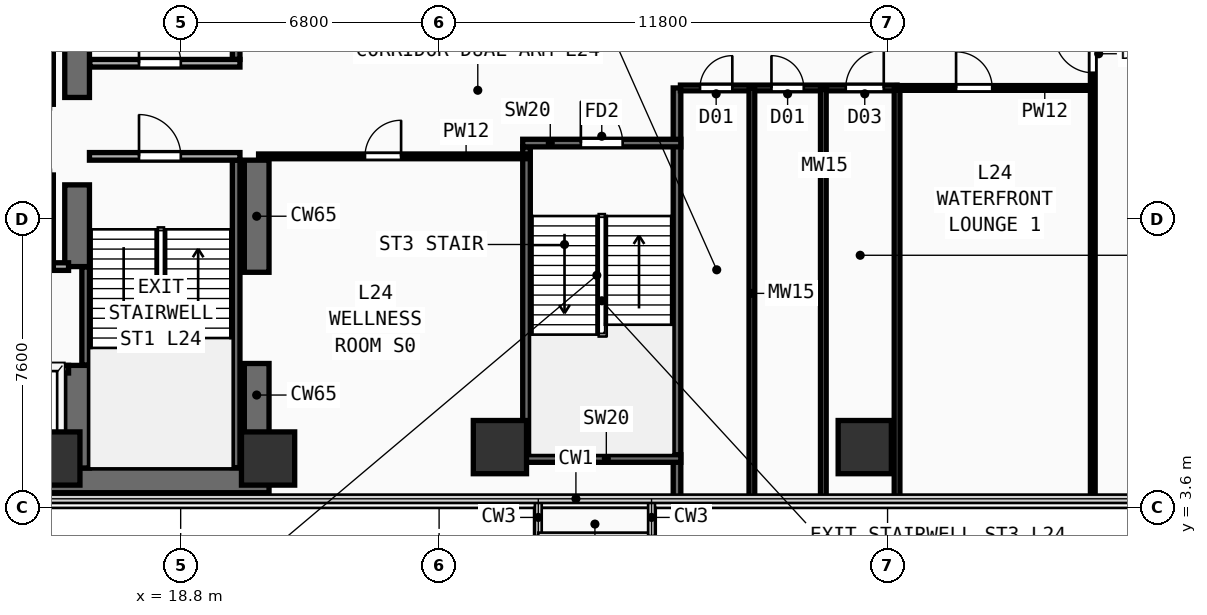
"""IFC4 building model, lengths in metres.
Left out: names, types, materials, properties, quantities, classifications, styles, units other than length and angle.
Written with IfcOpenShell. Run it as: python <this file> out.ifc"""

import sys

from ifc_helpers import new_model, si_unit, direction, frame, frame_2d, origin, origin_2d, place, context, subcontext, project, spatial, rectangle, extrude, element, fill, save


model = new_model("IFC4")
c1 = context("Model", 3, precision=1e-05, world=origin(), true_north=direction((0.0, 1.0)))
c2 = subcontext(c1, "Body", "Model", "MODEL_VIEW")
j1 = project(units=[si_unit("LENGTHUNIT", "METRE"), si_unit("PLANEANGLEUNIT", "RADIAN")], contexts=[c1])
p1 = place(None, origin())
s1 = spatial("IfcSite", under=j1, at=p1, CompositionType="ELEMENT")
p2 = place(p1, origin())
s2 = spatial("IfcBuilding", under=s1, at=p2, CompositionType="ELEMENT")
p3 = place(p2, frame((0.0, 0.0, 95.5)))
s3 = spatial("IfcBuildingStorey", under=s2, at=p3, CompositionType="ELEMENT", Elevation=95.5)
p4 = place(p3, frame((7.125, 4.325, 0.0), z_axis=(0.0, 0.0, 1.0), x_axis=(1.0, 0.0, 0.0)))
e1 = element("IfcWall", 1, at=p4, inside=s3, PredefinedType="SHEAR", context=c2, shape_type="SweptSolid", body=[
    extrude(rectangle(XDim=14.0, YDim=0.65, at=frame_2d((7.0, 0.0))), origin(), (0.0, 0.0, 1.0), 3.54),
])
p5 = place(p3, frame((20.8, 4.65, 0.0), z_axis=(0.0, 0.0, 1.0), x_axis=(0.0, 1.0, 0.0)))
e2 = element("IfcWall", 2, at=p5, inside=s3, PredefinedType="SHEAR", context=c2, shape_type="SweptSolid", body=[
    extrude(rectangle(XDim=2.75, YDim=0.65, at=frame_2d((1.375, 0.0))), origin(), (0.0, 0.0, 1.0), 3.54),
])
p6 = place(p3, frame((20.8, 9.8, 0.0), z_axis=(0.0, 0.0, 1.0), x_axis=(0.0, 1.0, 0.0)))
e3 = element("IfcWall", 3, at=p6, inside=s3, PredefinedType="SHEAR", context=c2, shape_type="SweptSolid", body=[
    extrude(rectangle(XDim=2.95, YDim=0.65, at=frame_2d((1.475, 0.0))), origin(), (0.0, 0.0, 1.0), 3.54),
])
p7 = place(p3, frame((16.075, 4.65, 0.0), z_axis=(0.0, 0.0, 1.0), x_axis=(0.0, 1.0, 0.0)))
e4 = element("IfcWall", 4, at=p7, inside=s3, PredefinedType="SHEAR", context=c2, shape_type="SweptSolid", body=[
    extrude(rectangle(XDim=2.7, YDim=0.65, at=frame_2d((1.35, 0.0))), origin(), (0.0, 0.0, 1.0), 3.54),
])
p8 = place(p3, frame((16.075, 9.95, 0.0), z_axis=(0.0, 0.0, 1.0), x_axis=(0.0, 1.0, 0.0)))
e5 = element("IfcWall", 5, at=p8, inside=s3, PredefinedType="SHEAR", context=c2, shape_type="SweptSolid", body=[
    extrude(rectangle(XDim=2.15, YDim=0.65, at=frame_2d((1.075, 0.0))), origin(), (0.0, 0.0, 1.0), 3.54),
])
p9 = place(p3, frame((16.075, 14.4, 0.0), z_axis=(0.0, 0.0, 1.0), x_axis=(0.0, 1.0, 0.0)))
e6 = element("IfcWall", 6, at=p9, inside=s3, PredefinedType="SHEAR", context=c2, shape_type="SweptSolid", body=[
    extrude(rectangle(XDim=9.1, YDim=0.65, at=frame_2d((4.55, 0.0))), origin(), (0.0, 0.0, 1.0), 3.54),
])
for number, where, z_axis, x_axis in (
    (7, (15.45, 4.9, 0.0), (0.0, 0.0, 1.0), (1.0, 0.0, 0.0)),
    (8, (21.1, 4.9, 0.0), (0.0, 0.0, 1.0), (1.0, 0.0, 0.0)),
    (9, (27.2, 5.2, 0.0), (0.0, 0.0, 1.0), (1.0, 0.0, 0.0)),
    (10, (36.8, 5.2, 0.0), (0.0, 0.0, 1.0), (1.0, 0.0, 0.0)),
):
    element("IfcColumn", number, at=place(p3, frame(where, z_axis=z_axis, x_axis=x_axis)), inside=s3, PredefinedType="COLUMN", context=c2, shape_type="SweptSolid", body=[
        extrude(rectangle(XDim=1.4, YDim=1.4, at=origin_2d()), origin(), (0.0, 0.0, 1.0), 3.54),
    ])
p10 = place(p3, frame((16.3, 7.36, 0.0), z_axis=(0.0, 0.0, 1.0), x_axis=(0.0, 1.0, 0.0)))
e11 = element("IfcWall", 11, at=p10, inside=s3, PredefinedType="SHEAR", context=c2, shape_type="SweptSolid", body=[
    extrude(rectangle(XDim=2.58, YDim=0.2, at=frame_2d((1.29, 0.0))), origin(), (0.0, 0.0, 1.0), 3.54),
])
p11 = place(p3, frame((20.26, 4.66, 0.0), z_axis=(0.0, 0.0, 1.0), x_axis=(0.0, 1.0, 0.0)))
e12 = element("IfcWall", 12, at=p11, inside=s3, PredefinedType="SHEAR", context=c2, shape_type="SweptSolid", body=[
    extrude(rectangle(XDim=8.09, YDim=0.2, at=frame_2d((4.045, 0.0))), origin(), (0.0, 0.0, 1.0), 3.54),
])
p12 = place(p3, frame((16.4, 12.85, 0.0), z_axis=(0.0, 0.0, 1.0), x_axis=(1.0, 0.0, 0.0)))
e13 = element("IfcWall", 13, at=p12, inside=s3, PredefinedType="PARTITIONING", context=c2, shape_type="SweptSolid", body=[
    extrude(rectangle(XDim=3.96, YDim=0.2, at=frame_2d((1.98, 0.0))), origin(), (0.0, 0.0, 1.0), 3.54),
])
p13 = place(p12, frame((1.304, 0.0, 0.0)))
e14 = element("IfcOpeningElement", 14, at=p13, cuts=e13, PredefinedType="OPENING", context=c2, shape_type="SweptSolid", body=[
    extrude(rectangle(XDim=1.1, YDim=2.2, at=frame_2d((0.55, 1.1))), frame((0.0, 0.11, 0.0), z_axis=(0.0, -1.0, 0.0), x_axis=(1.0, 0.0, 0.0)), (0.0, 0.0, 1.0), 0.22),
])
p14 = place(p3, frame((20.26, 15.4, 0.0), z_axis=(0.0, 0.0, 1.0), x_axis=(0.0, 1.0, 0.0)))
e15 = element("IfcWall", 15, at=p14, inside=s3, PredefinedType="SHEAR", context=c2, shape_type="SweptSolid", body=[
    extrude(rectangle(XDim=8.09, YDim=0.2, at=frame_2d((4.045, 0.0))), origin(), (0.0, 0.0, 1.0), 3.54),
])
p15 = place(p3, frame((16.41, 15.3, 0.0), z_axis=(0.0, 0.0, 1.0), x_axis=(1.0, 0.0, 0.0)))
e16 = element("IfcWall", 16, at=p15, inside=s3, PredefinedType="PARTITIONING", context=c2, shape_type="SweptSolid", body=[
    extrude(rectangle(XDim=3.95, YDim=0.2, at=frame_2d((1.975, 0.0))), origin(), (0.0, 0.0, 1.0), 3.54),
])
p16 = place(p15, frame((1.294, 0.0, 0.0)))
e17 = element("IfcOpeningElement", 17, at=p16, cuts=e16, PredefinedType="OPENING", context=c2, shape_type="SweptSolid", body=[
    extrude(rectangle(XDim=1.1, YDim=2.2, at=frame_2d((0.55, 1.1))), frame((0.0, 0.11, 0.0), z_axis=(0.0, -1.0, 0.0), x_axis=(1.0, 0.0, 0.0)), (0.0, 0.0, 1.0), 0.22),
])
p17 = place(p3, frame((27.9, 5.0, 0.0), z_axis=(0.0, 0.0, 1.0), x_axis=(0.0, 1.0, 0.0)))
e18 = element("IfcWall", 18, at=p17, inside=s3, PredefinedType="SHEAR", context=c2, shape_type="SweptSolid", body=[
    extrude(rectangle(XDim=8.1, YDim=0.2, at=frame_2d((4.05, 0.0))), origin(), (0.0, 0.0, 1.0), 3.54),
])
p18 = place(p3, frame((31.86, 3.84, 0.0), z_axis=(0.0, 0.0, 1.0), x_axis=(0.0, 1.0, 0.0)))
e19 = element("IfcWall", 19, at=p18, inside=s3, PredefinedType="SHEAR", context=c2, shape_type="SweptSolid", body=[
    extrude(rectangle(XDim=10.81, YDim=0.2, at=frame_2d((5.405, 0.0))), origin(), (0.0, 0.0, 1.0), 3.54),
])
p19 = place(p3, frame((27.8, 4.9, 0.0), z_axis=(0.0, 0.0, 1.0), x_axis=(1.0, 0.0, 0.0)))
e20 = element("IfcWall", 20, at=p19, inside=s3, PredefinedType="SHEAR", context=c2, shape_type="SweptSolid", body=[
    extrude(rectangle(XDim=4.16, YDim=0.2, at=frame_2d((2.08, 0.0))), origin(), (0.0, 0.0, 1.0), 3.54),
])
p20 = place(p3, frame((27.8, 13.2, 0.0), z_axis=(0.0, 0.0, 1.0), x_axis=(1.0, 0.0, 0.0)))
e21 = element("IfcWall", 21, at=p20, inside=s3, PredefinedType="SHEAR", context=c2, shape_type="SweptSolid", body=[
    extrude(rectangle(XDim=4.16, YDim=0.2, at=frame_2d((2.08, 0.0))), origin(), (0.0, 0.0, 1.0), 3.54),
])
p21 = place(p20, frame((1.53, 0.0, 0.0)))
e22 = element("IfcOpeningElement", 22, at=p21, cuts=e21, PredefinedType="OPENING", context=c2, shape_type="SweptSolid", body=[
    extrude(rectangle(XDim=1.1, YDim=2.2, at=frame_2d((0.55, 1.1))), frame((0.0, 0.11, 0.0), z_axis=(0.0, -1.0, 0.0), x_axis=(1.0, 0.0, 0.0)), (0.0, 0.0, 1.0), 0.22),
])
p22 = place(p3, frame((7.5, 7.25, 0.0), z_axis=(0.0, 0.0, 1.0), x_axis=(1.0, 0.0, 0.0)))
e23 = element("IfcWall", 23, at=p22, inside=s3, PredefinedType="PARTITIONING", context=c2, shape_type="SweptSolid", body=[
    extrude(rectangle(XDim=8.35, YDim=0.2, at=frame_2d((4.175, 0.0))), origin(), (0.0, 0.0, 1.0), 3.54),
])
p23 = place(p22, frame((0.53, 0.0, 0.0)))
e24 = element("IfcOpeningElement", 24, at=p23, cuts=e23, PredefinedType="OPENING", context=c2, shape_type="SweptSolid", body=[
    extrude(rectangle(XDim=1.1, YDim=2.2, at=frame_2d((0.55, 1.1))), frame((0.0, 0.11, 0.0), z_axis=(0.0, -1.0, 0.0), x_axis=(1.0, 0.0, 0.0)), (0.0, 0.0, 1.0), 0.22),
])
p24 = place(p22, frame((2.37, 0.0, 0.0)))
e25 = element("IfcOpeningElement", 25, at=p24, cuts=e23, PredefinedType="OPENING", context=c2, shape_type="SweptSolid", body=[
    extrude(rectangle(XDim=1.1, YDim=2.2, at=frame_2d((0.55, 1.1))), frame((0.0, 0.11, 0.0), z_axis=(0.0, -1.0, 0.0), x_axis=(1.0, 0.0, 0.0)), (0.0, 0.0, 1.0), 0.22),
])
p25 = place(p22, frame((4.33, 0.0, 0.0)))
e26 = element("IfcOpeningElement", 26, at=p25, cuts=e23, PredefinedType="OPENING", context=c2, shape_type="SweptSolid", body=[
    extrude(rectangle(XDim=1.1, YDim=2.2, at=frame_2d((0.55, 1.1))), frame((0.0, 0.11, 0.0), z_axis=(0.0, -1.0, 0.0), x_axis=(1.0, 0.0, 0.0)), (0.0, 0.0, 1.0), 0.22),
])
p26 = place(p22, frame((6.5, 0.0, 0.0)))
e27 = element("IfcOpeningElement", 27, at=p26, cuts=e23, PredefinedType="OPENING", context=c2, shape_type="SweptSolid", body=[
    extrude(rectangle(XDim=1.1, YDim=2.2, at=frame_2d((0.55, 1.1))), frame((0.0, 0.11, 0.0), z_axis=(0.0, -1.0, 0.0), x_axis=(1.0, 0.0, 0.0)), (0.0, 0.0, 1.0), 0.22),
])
p27 = place(p3, frame((7.5, 9.95, 0.0), z_axis=(0.0, 0.0, 1.0), x_axis=(1.0, 0.0, 0.0)))
e28 = element("IfcWall", 28, at=p27, inside=s3, PredefinedType="PARTITIONING", context=c2, shape_type="SweptSolid", body=[
    extrude(rectangle(XDim=8.35, YDim=0.2, at=frame_2d((4.175, 0.0))), origin(), (0.0, 0.0, 1.0), 3.54),
])
p28 = place(p3, frame((15.35, 9.95, 0.0), z_axis=(0.0, 0.0, 1.0), x_axis=(0.0, 1.0, 0.0)))
e29 = element("IfcWall", 29, at=p28, inside=s3, PredefinedType="PARTITIONING", context=c2, shape_type="SweptSolid", body=[
    extrude(rectangle(XDim=2.41, YDim=0.2, at=frame_2d((1.205, 0.0))), origin(), (0.0, 0.0, 1.0), 3.54),
])
p29 = place(p3, frame((15.35, 14.22, 0.0), z_axis=(0.0, 0.0, 1.0), x_axis=(0.0, 1.0, 0.0)))
e30 = element("IfcWall", 30, at=p29, inside=s3, PredefinedType="PARTITIONING", context=c2, shape_type="SweptSolid", body=[
    extrude(rectangle(XDim=2.23, YDim=0.2, at=frame_2d((1.115, 0.0))), origin(), (0.0, 0.0, 1.0), 3.54),
])
p30 = place(p3, frame((31.95, 14.65, 0.0), z_axis=(0.0, 0.0, 1.0), x_axis=(1.0, 0.0, 0.0)))
e31 = element("IfcWall", 31, at=p30, inside=s3, PredefinedType="PLUMBINGWALL", context=c2, shape_type="SweptSolid", body=[
    extrude(rectangle(XDim=5.7, YDim=0.15, at=frame_2d((2.85, 0.0))), origin(), (0.0, 0.0, 1.0), 3.54),
])
p31 = place(p30, frame((0.515, 0.0, 0.0)))
e32 = element("IfcOpeningElement", 32, at=p31, cuts=e31, PredefinedType="OPENING", context=c2, shape_type="SweptSolid", body=[
    extrude(rectangle(XDim=0.85, YDim=2.15, at=frame_2d((0.425, 1.075))), frame((0.0, 0.085, 0.0), z_axis=(0.0, -1.0, 0.0), x_axis=(1.0, 0.0, 0.0)), (0.0, 0.0, 1.0), 0.17),
])
p32 = place(p30, frame((2.395, 0.0, 0.0)))
e33 = element("IfcOpeningElement", 33, at=p32, cuts=e31, PredefinedType="OPENING", context=c2, shape_type="SweptSolid", body=[
    extrude(rectangle(XDim=0.85, YDim=2.15, at=frame_2d((0.425, 1.075))), frame((0.0, 0.085, 0.0), z_axis=(0.0, -1.0, 0.0), x_axis=(1.0, 0.0, 0.0)), (0.0, 0.0, 1.0), 0.17),
])
p33 = place(p30, frame((4.35, 0.0, 0.0)))
e34 = element("IfcOpeningElement", 34, at=p33, cuts=e31, PredefinedType="OPENING", context=c2, shape_type="SweptSolid", body=[
    extrude(rectangle(XDim=1.0, YDim=2.2, at=frame_2d((0.5, 1.1))), frame((0.0, 0.085, 0.0), z_axis=(0.0, -1.0, 0.0), x_axis=(1.0, 0.0, 0.0)), (0.0, 0.0, 1.0), 0.17),
])
for number, where, z_axis, x_axis in (
    (35, (33.83, 3.84, 0.0), (0.0, 0.0, 1.0), (0.0, 1.0, 0.0)),
    (36, (35.71, 3.84, 0.0), (0.0, 0.0, 1.0), (0.0, 1.0, 0.0)),
    (37, (37.65, 3.84, 0.0), (0.0, 0.0, 1.0), (0.0, 1.0, 0.0)),
):
    element("IfcWall", number, at=place(p3, frame(where, z_axis=z_axis, x_axis=x_axis)), inside=s3, PredefinedType="PLUMBINGWALL", context=c2, shape_type="SweptSolid", body=[
        extrude(rectangle(XDim=10.81, YDim=0.15, at=frame_2d((5.405, 0.0))), origin(), (0.0, 0.0, 1.0), 3.54),
    ])
p34 = place(p3, frame((20.85, 12.85, 0.0), z_axis=(0.0, 0.0, 1.0), x_axis=(1.0, 0.0, 0.0)))
e38 = element("IfcWall", 38, at=p34, inside=s3, PredefinedType="PARTITIONING", context=c2, shape_type="SweptSolid", body=[
    extrude(rectangle(XDim=7.05, YDim=0.125, at=frame_2d((3.525, 0.0))), origin(), (0.0, 0.0, 1.0), 3.54),
])
p35 = place(p34, frame((2.8, 0.0, 0.0)))
e39 = element("IfcOpeningElement", 39, at=p35, cuts=e38, PredefinedType="OPENING", context=c2, shape_type="SweptSolid", body=[
    extrude(rectangle(XDim=0.95, YDim=2.15, at=frame_2d((0.475, 1.075))), frame((0.0, 0.073, 0.0), z_axis=(0.0, -1.0, 0.0), x_axis=(1.0, 0.0, 0.0)), (0.0, 0.0, 1.0), 0.145),
])
p36 = place(p3, frame((37.65, 14.65, 0.0), z_axis=(0.0, 0.0, 1.0), x_axis=(1.0, 0.0, 0.0)))
e40 = element("IfcWall", 40, at=p36, inside=s3, PredefinedType="PARTITIONING", context=c2, shape_type="SweptSolid", body=[
    extrude(rectangle(XDim=5.15, YDim=0.125, at=frame_2d((2.575, 0.0))), origin(), (0.0, 0.0, 1.0), 3.54),
])
p37 = place(p36, frame((1.553, 0.0, 0.0)))
e41 = element("IfcOpeningElement", 41, at=p37, cuts=e40, PredefinedType="OPENING", context=c2, shape_type="SweptSolid", body=[
    extrude(rectangle(XDim=0.95, YDim=2.15, at=frame_2d((0.475, 1.075))), frame((0.0, 0.073, 0.0), z_axis=(0.0, -1.0, 0.0), x_axis=(1.0, 0.0, 0.0)), (0.0, 0.0, 1.0), 0.145),
])
p38 = place(p3, frame((42.8, 3.84, 0.0), z_axis=(0.0, 0.0, 1.0), x_axis=(0.0, 1.0, 0.0)))
e42 = element("IfcWall", 42, at=p38, inside=s3, PredefinedType="PARTITIONING", context=c2, shape_type="SweptSolid", body=[
    extrude(rectangle(XDim=20.12, YDim=0.125, at=frame_2d((10.06, 0.0))), origin(), (0.0, 0.0, 1.0), 3.54),
])
p39 = place(p38, frame((11.21, 0.0, 0.0)))
e43 = element("IfcOpeningElement", 43, at=p39, cuts=e42, PredefinedType="OPENING", context=c2, shape_type="SweptSolid", body=[
    extrude(rectangle(XDim=1.0, YDim=2.2, at=frame_2d((0.5, 1.1))), frame((0.0, 0.073, 0.0), z_axis=(0.0, -1.0, 0.0), x_axis=(1.0, 0.0, 0.0)), (0.0, 0.0, 1.0), 0.145),
])
p40 = place(p13, frame((1.1, 0.0, 0.0), z_axis=(0.0, 0.0, 1.0), x_axis=(-1.0, 0.0, 0.0)))
e44 = element("IfcDoor", 44, at=p40, inside=s3, OperationType="SINGLE_SWING_RIGHT", PredefinedType="DOOR", context=c2, shape_type="SweptSolid", body=[
    extrude(rectangle(XDim=1.1, YDim=2.2, at=frame_2d((0.55, 1.1))), frame((0.0, 0.025, 0.0), z_axis=(0.0, -1.0, 0.0), x_axis=(1.0, 0.0, 0.0)), (0.0, 0.0, 1.0), 0.05),
])
fill(e14, e44)
p41 = place(p16, origin())
e45 = element("IfcDoor", 45, at=p41, inside=s3, OperationType="SINGLE_SWING_LEFT", PredefinedType="DOOR", context=c2, shape_type="SweptSolid", body=[
    extrude(rectangle(XDim=1.1, YDim=2.2, at=frame_2d((0.55, 1.1))), frame((0.0, 0.025, 0.0), z_axis=(0.0, -1.0, 0.0), x_axis=(1.0, 0.0, 0.0)), (0.0, 0.0, 1.0), 0.05),
])
fill(e17, e45)
p42 = place(p21, frame((1.1, 0.0, 0.0), z_axis=(0.0, 0.0, 1.0), x_axis=(-1.0, 0.0, 0.0)))
e46 = element("IfcDoor", 46, at=p42, inside=s3, OperationType="SINGLE_SWING_RIGHT", PredefinedType="DOOR", context=c2, shape_type="SweptSolid", body=[
    extrude(rectangle(XDim=1.1, YDim=2.2, at=frame_2d((0.55, 1.1))), frame((0.0, 0.025, 0.0), z_axis=(0.0, -1.0, 0.0), x_axis=(1.0, 0.0, 0.0)), (0.0, 0.0, 1.0), 0.05),
])
fill(e22, e46)
p43 = place(p31, origin())
e47 = element("IfcDoor", 47, at=p43, inside=s3, OperationType="SINGLE_SWING_RIGHT", PredefinedType="DOOR", context=c2, shape_type="SweptSolid", body=[
    extrude(rectangle(XDim=0.85, YDim=2.15, at=frame_2d((0.425, 1.075))), frame((0.0, 0.025, 0.0), z_axis=(0.0, -1.0, 0.0), x_axis=(1.0, 0.0, 0.0)), (0.0, 0.0, 1.0), 0.05),
])
fill(e32, e47)
p44 = place(p32, origin())
e48 = element("IfcDoor", 48, at=p44, inside=s3, OperationType="SINGLE_SWING_LEFT", PredefinedType="DOOR", context=c2, shape_type="SweptSolid", body=[
    extrude(rectangle(XDim=0.85, YDim=2.15, at=frame_2d((0.425, 1.075))), frame((0.0, 0.025, 0.0), z_axis=(0.0, -1.0, 0.0), x_axis=(1.0, 0.0, 0.0)), (0.0, 0.0, 1.0), 0.05),
])
fill(e33, e48)
p45 = place(p33, origin())
e49 = element("IfcDoor", 49, at=p45, inside=s3, OperationType="SINGLE_SWING_RIGHT", PredefinedType="DOOR", context=c2, shape_type="SweptSolid", body=[
    extrude(rectangle(XDim=1.0, YDim=2.2, at=frame_2d((0.5, 1.1))), frame((0.0, 0.025, 0.0), z_axis=(0.0, -1.0, 0.0), x_axis=(1.0, 0.0, 0.0)), (0.0, 0.0, 1.0), 0.05),
])
fill(e34, e49)
p46 = place(p35, origin())
e50 = element("IfcDoor", 50, at=p46, inside=s3, OperationType="SINGLE_SWING_RIGHT", PredefinedType="DOOR", context=c2, shape_type="SweptSolid", body=[
    extrude(rectangle(XDim=0.95, YDim=2.15, at=frame_2d((0.475, 1.075))), frame((0.0, 0.025, 0.0), z_axis=(0.0, -1.0, 0.0), x_axis=(1.0, 0.0, 0.0)), (0.0, 0.0, 1.0), 0.05),
])
fill(e39, e50)
p47 = place(p37, origin())
e51 = element("IfcDoor", 51, at=p47, inside=s3, OperationType="SINGLE_SWING_LEFT", PredefinedType="DOOR", context=c2, shape_type="SweptSolid", body=[
    extrude(rectangle(XDim=0.95, YDim=2.15, at=frame_2d((0.475, 1.075))), frame((0.0, 0.025, 0.0), z_axis=(0.0, -1.0, 0.0), x_axis=(1.0, 0.0, 0.0)), (0.0, 0.0, 1.0), 0.05),
])
fill(e41, e51)
p48 = place(p39, origin())
e52 = element("IfcDoor", 52, at=p48, inside=s3, OperationType="SINGLE_SWING_RIGHT", PredefinedType="DOOR", context=c2, shape_type="SweptSolid", body=[
    extrude(rectangle(XDim=1.0, YDim=2.2, at=frame_2d((0.5, 1.1))), frame((0.0, 0.025, 0.0), z_axis=(0.0, -1.0, 0.0), x_axis=(1.0, 0.0, 0.0)), (0.0, 0.0, 1.0), 0.05),
])
fill(e43, e52)
save(model, sys.argv[1])
